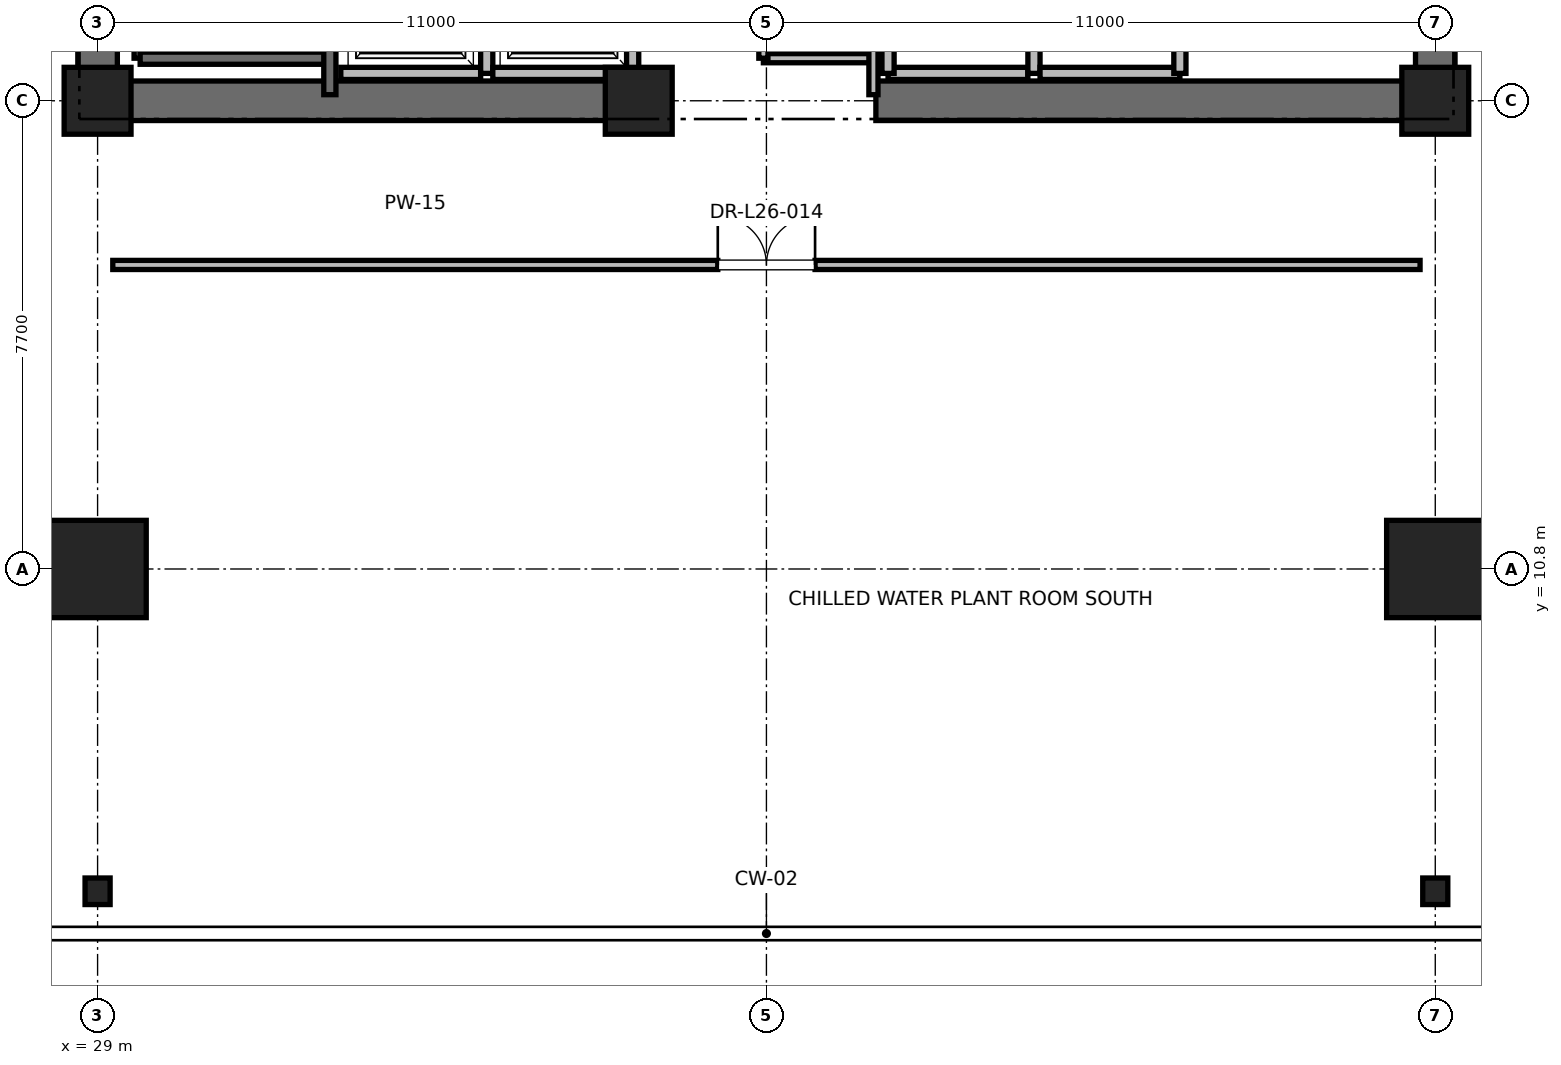
"""IFC4 building model, lengths in metres.
Left out: names, types, materials, properties, quantities, classifications, styles, units other than length and angle.
Written with IfcOpenShell. Run it as: python <this file> out.ifc"""

import sys

from ifc_helpers import new_model, si_unit, direction, frame, frame_2d, origin, origin_2d, place, context, subcontext, project, spatial, rectangle, i_section, extrude, element, fill, save


model = new_model("IFC4")
c1 = context("Model", 3, precision=1e-05, world=origin(), true_north=direction((0.0, 1.0)))
c2 = subcontext(c1, "Body", "Model", "MODEL_VIEW")
j1 = project(units=[si_unit("LENGTHUNIT", "METRE"), si_unit("PLANEANGLEUNIT", "RADIAN")], contexts=[c1])
p1 = place(None, origin())
s1 = spatial("IfcSite", under=j1, at=p1, CompositionType="ELEMENT")
p2 = place(p1, origin())
s2 = spatial("IfcBuilding", under=s1, at=p2, CompositionType="ELEMENT")
p3 = place(p2, frame((0.0, 0.0, 113.0)))
s3 = spatial("IfcBuildingStorey", under=s2, at=p3, CompositionType="ELEMENT", Elevation=113.0)
for number, where, z_axis, x_axis in (
    (1, (29.0, 10.8, 0.0), (0.0, 0.0, 1.0), (1.0, 0.0, 0.0)),
    (2, (51.0, 10.8, 0.0), (0.0, 0.0, 1.0), (1.0, 0.0, 0.0)),
):
    element("IfcColumn", number, at=place(p3, frame(where, z_axis=z_axis, x_axis=x_axis)), inside=s3, PredefinedType="COLUMN", context=c2, shape_type="SweptSolid", body=[
        extrude(rectangle(XDim=1.6, YDim=1.6, at=origin_2d()), origin(), (0.0, 0.0, 1.0), 5.4),
    ])
for number, where, z_axis, x_axis in (
    (3, (29.0, 5.5, 0.0), (0.0, 0.0, 1.0), (1.0, 0.0, 0.0)),
    (4, (51.0, 5.5, 0.0), (0.0, 0.0, 1.0), (1.0, 0.0, 0.0)),
):
    element("IfcColumn", number, at=place(p3, frame(where, z_axis=z_axis, x_axis=x_axis)), inside=s3, PredefinedType="COLUMN", context=c2, shape_type="SweptSolid", body=[
        extrude(i_section(OverallWidth=0.412, OverallDepth=0.437, WebThickness=0.036, FlangeThickness=0.058, FilletRadius=0.015, at=origin_2d()), origin(), (0.0, 0.0, 1.0), 5.4),
    ])
for number, where, z_axis, x_axis in (
    (5, (29.0, 18.5, 0.0), (0.0, 0.0, 1.0), (1.0, 0.0, 0.0)),
    (6, (51.0, 18.5, 0.0), (0.0, 0.0, 1.0), (1.0, 0.0, 0.0)),
    (7, (37.9, 18.5, 0.0), (0.0, 0.0, 1.0), (1.0, 0.0, 0.0)),
):
    element("IfcColumn", number, at=place(p3, frame(where, z_axis=z_axis, x_axis=x_axis)), inside=s3, PredefinedType="PILASTER", context=c2, shape_type="SweptSolid", body=[
        extrude(rectangle(XDim=1.1, YDim=1.1, at=origin_2d()), origin(), (0.0, 0.0, 1.0), 5.4),
    ])
for number, where, z_axis, x_axis in (
    (8, (29.0, 18.5, 0.0), (0.0, 0.0, 1.0), (1.0, 0.0, 0.0)),
    (9, (41.8, 18.5, 0.0), (0.0, 0.0, 1.0), (1.0, 0.0, 0.0)),
):
    element("IfcWall", number, at=place(p3, frame(where, z_axis=z_axis, x_axis=x_axis)), inside=s3, PredefinedType="SHEAR", context=c2, shape_type="SweptSolid", body=[
        extrude(rectangle(XDim=9.2, YDim=0.65, at=frame_2d((4.6, 0.0))), origin(), (0.0, 0.0, 1.0), 5.1),
    ])
p4 = place(p3, frame((29.0, 18.5, 0.0), z_axis=(0.0, 0.0, 1.0), x_axis=(0.0, 1.0, 0.0)))
e10 = element("IfcWall", 10, at=p4, inside=s3, PredefinedType="SHEAR", context=c2, shape_type="SweptSolid", body=[
    extrude(rectangle(XDim=8.8, YDim=0.65, at=frame_2d((4.4, 0.0))), origin(), (0.0, 0.0, 1.0), 5.1),
])
p5 = place(p3, frame((51.0, 18.5, 0.0), z_axis=(0.0, 0.0, 1.0), x_axis=(0.0, 1.0, 0.0)))
e11 = element("IfcWall", 11, at=p5, inside=s3, PredefinedType="SHEAR", context=c2, shape_type="SweptSolid", body=[
    extrude(rectangle(XDim=5.8, YDim=0.65, at=frame_2d((2.9, 0.0))), origin(), (0.0, 0.0, 1.0), 5.1),
])
p6 = place(p3, frame((29.7, 19.2, 0.0), z_axis=(0.0, 0.0, 1.0), x_axis=(0.0, 1.0, 0.0)))
e12 = element("IfcWall", 12, at=p6, inside=s3, PredefinedType="SOLIDWALL", context=c2, shape_type="SweptSolid", body=[
    extrude(rectangle(XDim=8.15, YDim=0.2, at=frame_2d((4.075, 0.0))), origin(), (0.0, 0.0, 1.0), 5.1),
])
p7 = place(p3, frame((29.7, 19.2, 0.0), z_axis=(0.0, 0.0, 1.0), x_axis=(1.0, 0.0, 0.0)))
e13 = element("IfcWall", 13, at=p7, inside=s3, PredefinedType="SOLIDWALL", context=c2, shape_type="SweptSolid", body=[
    extrude(rectangle(XDim=3.12, YDim=0.2, at=frame_2d((1.56, 0.0))), origin(), (0.0, 0.0, 1.0), 5.1),
])
p8 = place(p3, frame((32.82, 18.6, 0.0), z_axis=(0.0, 0.0, 1.0), x_axis=(0.0, 1.0, 0.0)))
e14 = element("IfcWall", 14, at=p8, inside=s3, PredefinedType="SOLIDWALL", context=c2, shape_type="SweptSolid", body=[
    extrude(rectangle(XDim=8.78, YDim=0.2, at=frame_2d((4.39, 0.0))), origin(), (0.0, 0.0, 1.0), 5.1),
])
p9 = place(p3, frame((33.0, 18.95, 0.0), z_axis=(0.0, 0.0, 1.0), x_axis=(1.0, 0.0, 0.0)))
e15 = element("IfcWall", 15, at=p9, inside=s3, PredefinedType="SOLIDWALL", context=c2, shape_type="SweptSolid", body=[
    extrude(rectangle(XDim=2.3, YDim=0.2, at=frame_2d((1.15, 0.0))), origin(), (0.0, 0.0, 1.0), 5.1),
])
p10 = place(p3, frame((35.4, 18.95, 0.0), z_axis=(0.0, 0.0, 1.0), x_axis=(0.0, 1.0, 0.0)))
e16 = element("IfcWall", 16, at=p10, inside=s3, PredefinedType="SOLIDWALL", context=c2, shape_type="SweptSolid", body=[
    extrude(rectangle(XDim=2.6, YDim=0.2, at=frame_2d((1.3, 0.0))), origin(), (0.0, 0.0, 1.0), 5.1),
])
p11 = place(p3, frame((35.5, 18.95, 0.0), z_axis=(0.0, 0.0, 1.0), x_axis=(1.0, 0.0, 0.0)))
e17 = element("IfcWall", 17, at=p11, inside=s3, PredefinedType="SOLIDWALL", context=c2, shape_type="SweptSolid", body=[
    extrude(rectangle(XDim=2.3, YDim=0.2, at=frame_2d((1.15, 0.0))), origin(), (0.0, 0.0, 1.0), 3.88),
])
p12 = place(p3, frame((37.8, 18.95, 0.0), z_axis=(0.0, 0.0, 1.0), x_axis=(0.0, 1.0, 0.0)))
e18 = element("IfcWall", 18, at=p12, inside=s3, PredefinedType="SOLIDWALL", context=c2, shape_type="SweptSolid", body=[
    extrude(rectangle(XDim=2.6, YDim=0.2, at=frame_2d((1.3, 0.0))), origin(), (0.0, 0.0, 1.0), 3.88),
])
p13 = place(p3, frame((42.0, 18.95, 0.0), z_axis=(0.0, 0.0, 1.0), x_axis=(1.0, 0.0, 0.0)))
e19 = element("IfcWall", 19, at=p13, inside=s3, PredefinedType="SOLIDWALL", context=c2, shape_type="SweptSolid", body=[
    extrude(rectangle(XDim=2.3, YDim=0.2, at=frame_2d((1.15, 0.0))), origin(), (0.0, 0.0, 1.0), 3.88),
])
p14 = place(p3, frame((42.0, 21.55, 0.0), z_axis=(0.0, 0.0, 1.0), x_axis=(0.0, -1.0, 0.0)))
e20 = element("IfcWall", 20, at=p14, inside=s3, PredefinedType="SOLIDWALL", context=c2, shape_type="SweptSolid", body=[
    extrude(rectangle(XDim=2.6, YDim=0.2, at=frame_2d((1.3, 0.0))), origin(), (0.0, 0.0, 1.0), 3.88),
])
p15 = place(p3, frame((44.4, 18.95, 0.0), z_axis=(0.0, 0.0, 1.0), x_axis=(0.0, 1.0, 0.0)))
e21 = element("IfcWall", 21, at=p15, inside=s3, PredefinedType="SOLIDWALL", context=c2, shape_type="SweptSolid", body=[
    extrude(rectangle(XDim=2.6, YDim=0.2, at=frame_2d((1.3, 0.0))), origin(), (0.0, 0.0, 1.0), 5.1),
])
p16 = place(p3, frame((44.5, 18.95, 0.0), z_axis=(0.0, 0.0, 1.0), x_axis=(1.0, 0.0, 0.0)))
e22 = element("IfcWall", 22, at=p16, inside=s3, PredefinedType="SOLIDWALL", context=c2, shape_type="SweptSolid", body=[
    extrude(rectangle(XDim=2.3, YDim=0.2, at=frame_2d((1.15, 0.0))), origin(), (0.0, 0.0, 1.0), 5.1),
])
p17 = place(p3, frame((46.8, 18.95, 0.0), z_axis=(0.0, 0.0, 1.0), x_axis=(0.0, 1.0, 0.0)))
e23 = element("IfcWall", 23, at=p17, inside=s3, PredefinedType="SOLIDWALL", context=c2, shape_type="SweptSolid", body=[
    extrude(rectangle(XDim=2.6, YDim=0.2, at=frame_2d((1.3, 0.0))), origin(), (0.0, 0.0, 1.0), 5.1),
])
p18 = place(p3, frame((39.95, 19.2, 0.0), z_axis=(0.0, 0.0, 1.0), x_axis=(1.0, 0.0, 0.0)))
e24 = element("IfcWall", 24, at=p18, inside=s3, PredefinedType="PARTITIONING", context=c2, shape_type="SweptSolid", body=[
    extrude(rectangle(XDim=1.81, YDim=0.15, at=frame_2d((0.905, 0.0))), origin(), (0.0, 0.0, 1.0), 2.85),
])
p19 = place(p3, frame((41.76, 18.6, 0.0), z_axis=(0.0, 0.0, 1.0), x_axis=(0.0, 1.0, 0.0)))
e25 = element("IfcWall", 25, at=p19, inside=s3, PredefinedType="PARTITIONING", context=c2, shape_type="SweptSolid", body=[
    extrude(rectangle(XDim=3.6, YDim=0.15, at=frame_2d((1.8, 0.0))), origin(), (0.0, 0.0, 1.0), 2.85),
])
p20 = place(p3, frame((39.95, 19.2, 0.0), z_axis=(0.0, 0.0, 1.0), x_axis=(0.0, 1.0, 0.0)))
e26 = element("IfcWall", 26, at=p20, inside=s3, PredefinedType="PARTITIONING", context=c2, shape_type="SweptSolid", body=[
    extrude(rectangle(XDim=3.0, YDim=0.15, at=frame_2d((1.5, 0.0))), origin(), (0.0, 0.0, 1.0), 2.85),
])
p21 = place(p20, frame((1.05, 0.0, 0.0)))
e27 = element("IfcOpeningElement", 27, at=p21, cuts=e26, PredefinedType="OPENING", context=c2, shape_type="SweptSolid", body=[
    extrude(rectangle(XDim=0.9, YDim=2.1, at=frame_2d((0.45, 1.05))), frame((0.0, 0.075, 0.0), z_axis=(0.0, -1.0, 0.0), x_axis=(1.0, 0.0, 0.0)), (0.0, 0.0, 1.0), 0.15),
])
p22 = place(p3, frame((29.25, 15.8, 0.0), z_axis=(0.0, 0.0, 1.0), x_axis=(1.0, 0.0, 0.0)))
e28 = element("IfcWall", 28, at=p22, inside=s3, PredefinedType="PARTITIONING", context=c2, shape_type="SweptSolid", body=[
    extrude(rectangle(XDim=21.5, YDim=0.15, at=frame_2d((10.75, 0.0))), origin(), (0.0, 0.0, 1.0), 2.85),
])
p23 = place(p22, frame((9.95, 0.0, 0.0)))
e29 = element("IfcOpeningElement", 29, at=p23, cuts=e28, PredefinedType="OPENING", context=c2, shape_type="SweptSolid", body=[
    extrude(rectangle(XDim=1.6, YDim=2.25, at=frame_2d((0.8, 1.125))), frame((0.0, 0.075, 0.0), z_axis=(0.0, -1.0, 0.0), x_axis=(1.0, 0.0, 0.0)), (0.0, 0.0, 1.0), 0.15),
])
p24 = place(p23, origin())
e30 = element("IfcDoor", 30, at=p24, inside=s3, OperationType="DOUBLE_DOOR_SINGLE_SWING", PredefinedType="DOOR", context=c2, shape_type="SweptSolid", body=[
    extrude(rectangle(XDim=1.6, YDim=2.25, at=frame_2d((0.8, 1.125))), frame((0.0, 0.025, 0.0), z_axis=(0.0, -1.0, 0.0), x_axis=(1.0, 0.0, 0.0)), (0.0, 0.0, 1.0), 0.05),
])
fill(e29, e30)
save(model, sys.argv[1])
